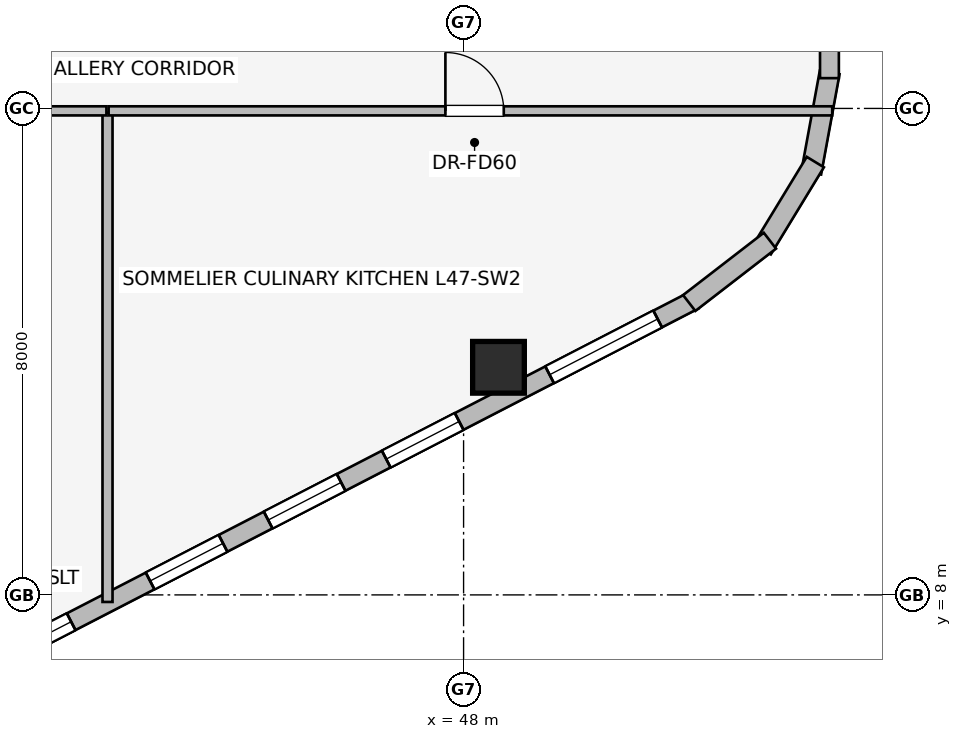
"""IFC4 building model, lengths in metres.
Left out: names, types, materials, properties, quantities, classifications, styles, units other than length and angle.
Written with IfcOpenShell. Run it as: python <this file> out.ifc"""

import sys

from ifc_helpers import new_model, si_unit, direction, frame, frame_2d, origin, origin_2d, place, context, subcontext, project, spatial, rectangle, extrude, element, fill, save


model = new_model("IFC4")
c1 = context("Model", 3, precision=1e-05, world=origin(), true_north=direction((0.0, 1.0)))
c2 = subcontext(c1, "Body", "Model", "MODEL_VIEW")
j1 = project(units=[si_unit("LENGTHUNIT", "METRE"), si_unit("PLANEANGLEUNIT", "RADIAN")], contexts=[c1])
p1 = place(None, origin())
s1 = spatial("IfcSite", under=j1, at=p1, CompositionType="ELEMENT")
p2 = place(p1, origin())
s2 = spatial("IfcBuilding", under=s1, at=p2, CompositionType="ELEMENT")
p3 = place(p2, frame((0.0, 0.0, 174.0)))
s3 = spatial("IfcBuildingStorey", under=s2, at=p3, CompositionType="ELEMENT", Elevation=174.0)
p4 = place(p3, frame((48.574, 11.743, 0.0), z_axis=(0.0, 0.0, 1.0), x_axis=(1.0, 0.0, 0.0)))
e1 = element("IfcColumn", 1, at=p4, inside=s3, PredefinedType="COLUMN", context=c2, shape_type="SweptSolid", body=[
    extrude(rectangle(XDim=0.85, YDim=0.85, at=origin_2d()), origin(), (0.0, 0.0, 1.0), 3.45),
])
p5 = place(p3, frame((51.792, 12.847, 0.0), z_axis=(0.0, 0.0, 1.0), x_axis=(-0.888626188278, -0.458632202867, 0.0)))
e2 = element("IfcWall", 2, at=p5, inside=s3, PredefinedType="STANDARD", context=c2, shape_type="SweptSolid", body=[
    extrude(rectangle(XDim=16.828, YDim=0.31, at=frame_2d((8.414, 0.0))), origin(), (0.0, 0.0, 1.0), 3.16),
])
p6 = place(p5, frame((0.675, 0.0, 0.75)))
e3 = element("IfcOpeningElement", 3, at=p6, cuts=e2, PredefinedType="OPENING", context=c2, shape_type="SweptSolid", body=[
    extrude(rectangle(XDim=2.0, YDim=1.5, at=frame_2d((1.0, 0.75))), frame((0.0, 0.165, 0.0), z_axis=(0.0, -1.0, 0.0), x_axis=(1.0, 0.0, 0.0)), (0.0, 0.0, 1.0), 0.33),
])
p7 = place(p5, frame((4.349, 0.0, 0.75)))
e4 = element("IfcOpeningElement", 4, at=p7, cuts=e2, PredefinedType="OPENING", context=c2, shape_type="SweptSolid", body=[
    extrude(rectangle(XDim=1.35, YDim=1.45, at=frame_2d((0.675, 0.725))), frame((0.0, 0.165, 0.0), z_axis=(0.0, -1.0, 0.0), x_axis=(1.0, 0.0, 0.0)), (0.0, 0.0, 1.0), 0.33),
])
p8 = place(p5, frame((6.534, 0.0, 0.75)))
e5 = element("IfcOpeningElement", 5, at=p8, cuts=e2, PredefinedType="OPENING", context=c2, shape_type="SweptSolid", body=[
    extrude(rectangle(XDim=1.35, YDim=1.45, at=frame_2d((0.675, 0.725))), frame((0.0, 0.165, 0.0), z_axis=(0.0, -1.0, 0.0), x_axis=(1.0, 0.0, 0.0)), (0.0, 0.0, 1.0), 0.33),
])
p9 = place(p5, frame((8.719, 0.0, 0.75)))
e6 = element("IfcOpeningElement", 6, at=p9, cuts=e2, PredefinedType="OPENING", context=c2, shape_type="SweptSolid", body=[
    extrude(rectangle(XDim=1.35, YDim=1.45, at=frame_2d((0.675, 0.725))), frame((0.0, 0.165, 0.0), z_axis=(0.0, -1.0, 0.0), x_axis=(1.0, 0.0, 0.0)), (0.0, 0.0, 1.0), 0.33),
])
p10 = place(p5, frame((11.53, 0.0, 0.75)))
e7 = element("IfcOpeningElement", 7, at=p10, cuts=e2, PredefinedType="OPENING", context=c2, shape_type="SweptSolid", body=[
    extrude(rectangle(XDim=1.05, YDim=1.4, at=frame_2d((0.525, 0.7))), frame((0.0, 0.165, 0.0), z_axis=(0.0, -1.0, 0.0), x_axis=(1.0, 0.0, 0.0)), (0.0, 0.0, 1.0), 0.33),
])
p11 = place(p5, frame((14.478, 0.0, 0.75)))
e8 = element("IfcOpeningElement", 8, at=p11, cuts=e2, PredefinedType="OPENING", context=c2, shape_type="SweptSolid", body=[
    extrude(rectangle(XDim=1.35, YDim=1.45, at=frame_2d((0.675, 0.725))), frame((0.0, 0.165, 0.0), z_axis=(0.0, -1.0, 0.0), x_axis=(1.0, 0.0, 0.0)), (0.0, 0.0, 1.0), 0.33),
])
p12 = place(p3, frame((54.021, 16.592, 0.0), z_axis=(0.0, 0.0, 1.0), x_axis=(-0.180717642671, -0.983535019014, 0.0)))
e9 = element("IfcWall", 9, at=p12, inside=s3, PredefinedType="STANDARD", context=c2, shape_type="SweptSolid", body=[
    extrude(rectangle(XDim=1.677, YDim=0.33, at=frame_2d((0.838, 0.0))), origin(), (0.0, 0.0, 1.0), 3.16),
])
p13 = place(p3, frame((53.785, 15.118, 0.0), z_axis=(0.0, 0.0, 1.0), x_axis=(-0.520219286058, -0.85403272444, 0.0)))
e10 = element("IfcWall", 10, at=p13, inside=s3, PredefinedType="STANDARD", context=c2, shape_type="SweptSolid", body=[
    extrude(rectangle(XDim=1.678, YDim=0.33, at=frame_2d((0.839, 0.0))), origin(), (0.0, 0.0, 1.0), 3.16),
])
p14 = place(p3, frame((53.038, 13.825, 0.0), z_axis=(0.0, 0.0, 1.0), x_axis=(-0.791464279355, -0.611215423976, 0.0)))
e11 = element("IfcWall", 11, at=p14, inside=s3, PredefinedType="STANDARD", context=c2, shape_type="SweptSolid", body=[
    extrude(rectangle(XDim=1.677, YDim=0.33, at=frame_2d((0.838, 0.0))), origin(), (0.0, 0.0, 1.0), 3.16),
])
p15 = place(p3, frame((54.017, 31.502, 0.0), z_axis=(0.0, 0.0, 1.0), x_axis=(0.0, -1.0, 0.0)))
e12 = element("IfcWall", 12, at=p15, inside=s3, PredefinedType="STANDARD", context=c2, shape_type="SweptSolid", body=[
    extrude(rectangle(XDim=15.004, YDim=0.31, at=frame_2d((7.502, 0.0))), origin(), (0.0, 0.0, 1.0), 3.16),
])
p16 = place(p15, frame((4.353, 0.0, 0.75)))
e13 = element("IfcOpeningElement", 13, at=p16, cuts=e12, PredefinedType="OPENING", context=c2, shape_type="SweptSolid", body=[
    extrude(rectangle(XDim=2.0, YDim=1.5, at=frame_2d((1.0, 0.75))), frame((0.0, 0.165, 0.0), z_axis=(0.0, -1.0, 0.0), x_axis=(1.0, 0.0, 0.0)), (0.0, 0.0, 1.0), 0.33),
])
p17 = place(p15, frame((8.083, 0.0, 0.75)))
e14 = element("IfcOpeningElement", 14, at=p17, cuts=e12, PredefinedType="OPENING", context=c2, shape_type="SweptSolid", body=[
    extrude(rectangle(XDim=1.35, YDim=1.45, at=frame_2d((0.675, 0.725))), frame((0.0, 0.165, 0.0), z_axis=(0.0, -1.0, 0.0), x_axis=(1.0, 0.0, 0.0)), (0.0, 0.0, 1.0), 0.33),
])
p18 = place(p15, frame((9.87, 0.0, 0.75)))
e15 = element("IfcOpeningElement", 15, at=p18, cuts=e12, PredefinedType="OPENING", context=c2, shape_type="SweptSolid", body=[
    extrude(rectangle(XDim=1.35, YDim=1.45, at=frame_2d((0.675, 0.725))), frame((0.0, 0.165, 0.0), z_axis=(0.0, -1.0, 0.0), x_axis=(1.0, 0.0, 0.0)), (0.0, 0.0, 1.0), 0.33),
])
p19 = place(p3, frame((42.144, 7.884, 0.0), z_axis=(0.0, 0.0, 1.0), x_axis=(0.0, 1.0, 0.0)))
e16 = element("IfcWall", 16, at=p19, inside=s3, PredefinedType="PARTITIONING", context=c2, shape_type="SweptSolid", body=[
    extrude(rectangle(XDim=8.046, YDim=0.165, at=frame_2d((4.023, 0.0))), origin(), (0.0, 0.0, 1.0), 3.16),
])
p20 = place(p3, frame((32.85, 15.96, 0.0), z_axis=(0.0, 0.0, 1.0), x_axis=(1.0, 0.0, 0.0)))
e17 = element("IfcWall", 17, at=p20, inside=s3, PredefinedType="PARTITIONING", context=c2, shape_type="SweptSolid", body=[
    extrude(rectangle(XDim=9.276, YDim=0.15, at=frame_2d((4.638, 0.0))), origin(), (0.0, 0.0, 1.0), 3.16),
])
p21 = place(p20, frame((4.158, 0.0, 0.0)))
e18 = element("IfcOpeningElement", 18, at=p21, cuts=e17, PredefinedType="OPENING", context=c2, shape_type="SweptSolid", body=[
    extrude(rectangle(XDim=0.96, YDim=2.0, at=frame_2d((0.48, 1.0))), frame((0.0, 0.085, 0.0), z_axis=(0.0, -1.0, 0.0), x_axis=(1.0, 0.0, 0.0)), (0.0, 0.0, 1.0), 0.17),
])
p22 = place(p3, frame((42.162, 15.96, 0.0), z_axis=(0.0, 0.0, 1.0), x_axis=(1.0, 0.0, 0.0)))
e19 = element("IfcWall", 19, at=p22, inside=s3, PredefinedType="PARTITIONING", context=c2, shape_type="SweptSolid", body=[
    extrude(rectangle(XDim=11.901, YDim=0.15, at=frame_2d((5.95, 0.0))), origin(), (0.0, 0.0, 1.0), 3.16),
])
p23 = place(p22, frame((5.539, 0.0, 0.0)))
e20 = element("IfcOpeningElement", 20, at=p23, cuts=e19, PredefinedType="OPENING", context=c2, shape_type="SweptSolid", body=[
    extrude(rectangle(XDim=0.96, YDim=2.0, at=frame_2d((0.48, 1.0))), frame((0.0, 0.085, 0.0), z_axis=(0.0, -1.0, 0.0), x_axis=(1.0, 0.0, 0.0)), (0.0, 0.0, 1.0), 0.17),
])
p24 = place(p6, origin())
e21 = element("IfcWindow", 21, at=p24, inside=s3, PartitioningType="SINGLE_PANEL", PredefinedType="WINDOW", context=c2, shape_type="SweptSolid", body=[
    extrude(rectangle(XDim=2.0, YDim=1.5, at=frame_2d((1.0, 0.75))), frame((0.0, 0.03, 0.0), z_axis=(0.0, -1.0, 0.0), x_axis=(1.0, 0.0, 0.0)), (0.0, 0.0, 1.0), 0.06),
])
fill(e3, e21)
p25 = place(p7, origin())
e22 = element("IfcWindow", 22, at=p25, inside=s3, PartitioningType="SINGLE_PANEL", PredefinedType="WINDOW", context=c2, shape_type="SweptSolid", body=[
    extrude(rectangle(XDim=1.35, YDim=1.45, at=frame_2d((0.675, 0.725))), frame((0.0, 0.03, 0.0), z_axis=(0.0, -1.0, 0.0), x_axis=(1.0, 0.0, 0.0)), (0.0, 0.0, 1.0), 0.06),
])
fill(e4, e22)
p26 = place(p8, origin())
e23 = element("IfcWindow", 23, at=p26, inside=s3, PartitioningType="SINGLE_PANEL", PredefinedType="WINDOW", context=c2, shape_type="SweptSolid", body=[
    extrude(rectangle(XDim=1.35, YDim=1.45, at=frame_2d((0.675, 0.725))), frame((0.0, 0.03, 0.0), z_axis=(0.0, -1.0, 0.0), x_axis=(1.0, 0.0, 0.0)), (0.0, 0.0, 1.0), 0.06),
])
fill(e5, e23)
p27 = place(p9, origin())
e24 = element("IfcWindow", 24, at=p27, inside=s3, PartitioningType="SINGLE_PANEL", PredefinedType="WINDOW", context=c2, shape_type="SweptSolid", body=[
    extrude(rectangle(XDim=1.35, YDim=1.45, at=frame_2d((0.675, 0.725))), frame((0.0, 0.03, 0.0), z_axis=(0.0, -1.0, 0.0), x_axis=(1.0, 0.0, 0.0)), (0.0, 0.0, 1.0), 0.06),
])
fill(e6, e24)
p28 = place(p10, origin())
e25 = element("IfcWindow", 25, at=p28, inside=s3, PartitioningType="SINGLE_PANEL", PredefinedType="WINDOW", context=c2, shape_type="SweptSolid", body=[
    extrude(rectangle(XDim=1.05, YDim=1.4, at=frame_2d((0.525, 0.7))), frame((0.0, 0.03, 0.0), z_axis=(0.0, -1.0, 0.0), x_axis=(1.0, 0.0, 0.0)), (0.0, 0.0, 1.0), 0.06),
])
fill(e7, e25)
p29 = place(p23, origin())
e26 = element("IfcDoor", 26, at=p29, inside=s3, OperationType="SINGLE_SWING_LEFT", PredefinedType="DOOR", context=c2, shape_type="SweptSolid", body=[
    extrude(rectangle(XDim=0.96, YDim=2.0, at=frame_2d((0.48, 1.0))), frame((0.0, 0.025, 0.0), z_axis=(0.0, -1.0, 0.0), x_axis=(1.0, 0.0, 0.0)), (0.0, 0.0, 1.0), 0.05),
])
fill(e20, e26)
save(model, sys.argv[1])
